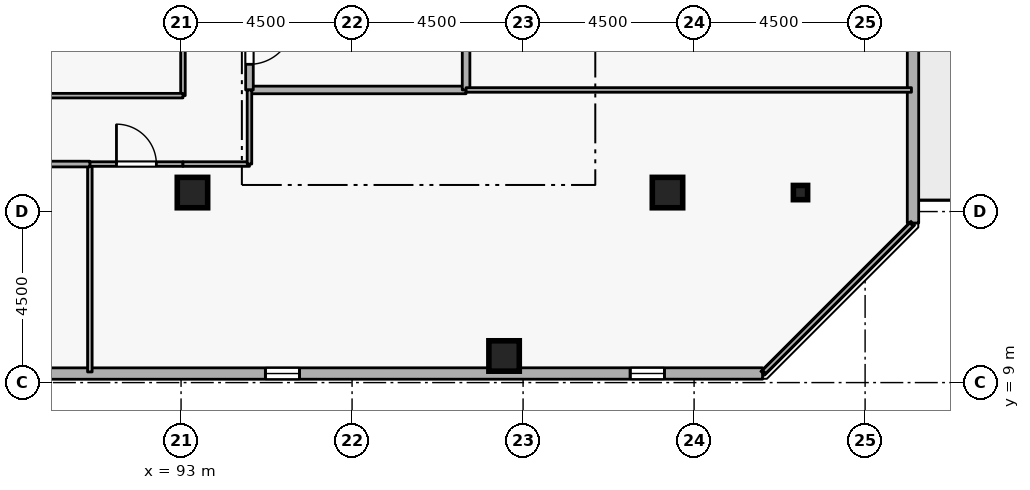
"""IFC4 building model, lengths in metres.
Left out: names, types, materials, properties, quantities, classifications, styles, units other than length and angle.
Written with IfcOpenShell. Run it as: python <this file> out.ifc"""

import sys

from ifc_helpers import new_model, si_unit, direction, frame, frame_2d, origin, origin_2d, place, context, subcontext, project, spatial, rectangle, i_section, extrude, element, fill, save


model = new_model("IFC4")
c1 = context("Model", 3, precision=1e-05, world=origin(), true_north=direction((0.0, 1.0)))
c2 = subcontext(c1, "Body", "Model", "MODEL_VIEW")
j1 = project(units=[si_unit("LENGTHUNIT", "METRE"), si_unit("PLANEANGLEUNIT", "RADIAN")], contexts=[c1])
p1 = place(None, origin())
s1 = spatial("IfcSite", under=j1, at=p1, CompositionType="ELEMENT")
p2 = place(p1, origin())
s2 = spatial("IfcBuilding", under=s1, at=p2, CompositionType="ELEMENT")
p3 = place(p2, frame((0.0, 0.0, 258.3)))
s3 = spatial("IfcBuildingStorey", under=s2, at=p3, CompositionType="ELEMENT", Elevation=258.3)
for number, where, z_axis, x_axis in (
    (1, (105.8, 14.0, 0.0), (0.0, 0.0, 1.0), (1.0, 0.0, 0.0)),
    (2, (101.5, 9.7, 0.0), (0.0, 0.0, 1.0), (1.0, 0.0, 0.0)),
    (3, (93.3, 14.0, 0.0), (0.0, 0.0, 1.0), (1.0, 0.0, 0.0)),
):
    element("IfcColumn", number, at=place(p3, frame(where, z_axis=z_axis, x_axis=x_axis)), inside=s3, PredefinedType="COLUMN", context=c2, shape_type="SweptSolid", body=[
        extrude(rectangle(XDim=0.8, YDim=0.8, at=origin_2d()), origin(), (0.0, 0.0, 1.0), 3.6),
    ])
p4 = place(p3, frame((109.3, 14.0, 0.0), z_axis=(0.0, 0.0, 1.0), x_axis=(1.0, 0.0, 0.0)))
e4 = element("IfcColumn", 4, at=p4, inside=s3, PredefinedType="COLUMN", context=c2, shape_type="SweptSolid", body=[
    extrude(i_section(OverallWidth=0.375, OverallDepth=0.375, WebThickness=0.017, FlangeThickness=0.027, FilletRadius=0.015, at=origin_2d()), origin(), (0.0, 0.0, 1.0), 3.6),
])
p5 = place(p3, frame((73.319, 9.235, 0.0), z_axis=(0.0, 0.0, 1.0), x_axis=(0.999999991209, 0.000132597301, 0.0)))
e5 = element("IfcWall", 5, at=p5, inside=s3, PredefinedType="STANDARD", context=c2, shape_type="SweptSolid", body=[
    extrude(rectangle(XDim=34.983, YDim=0.3, at=frame_2d((17.492, 0.0))), origin(), (0.0, 0.0, 1.0), 2.7),
])
p6 = place(p5, frame((7.5, 0.0, 0.72)))
e6 = element("IfcOpeningElement", 6, at=p6, cuts=e5, PredefinedType="OPENING", context=c2, shape_type="SweptSolid", body=[
    extrude(rectangle(XDim=0.9, YDim=1.75, at=frame_2d((0.45, 0.875))), frame((0.0, 0.16, 0.0), z_axis=(0.0, -1.0, 0.0), x_axis=(1.0, 0.0, 0.0)), (0.0, 0.0, 1.0), 0.32),
])
p7 = place(p5, frame((21.9, 0.0, 0.72)))
e7 = element("IfcOpeningElement", 7, at=p7, cuts=e5, PredefinedType="OPENING", context=c2, shape_type="SweptSolid", body=[
    extrude(rectangle(XDim=0.9, YDim=1.75, at=frame_2d((0.45, 0.875))), frame((0.0, 0.16, 0.0), z_axis=(0.0, -1.0, 0.0), x_axis=(1.0, 0.0, 0.0)), (0.0, 0.0, 1.0), 0.32),
])
p8 = place(p5, frame((31.5, 0.0, 0.72)))
e8 = element("IfcOpeningElement", 8, at=p8, cuts=e5, PredefinedType="OPENING", context=c2, shape_type="SweptSolid", body=[
    extrude(rectangle(XDim=0.9, YDim=1.75, at=frame_2d((0.45, 0.875))), frame((0.0, 0.16, 0.0), z_axis=(0.0, -1.0, 0.0), x_axis=(1.0, 0.0, 0.0)), (0.0, 0.0, 1.0), 0.32),
])
p9 = place(p3, frame((112.26, 13.198, 0.0), z_axis=(0.0, 0.0, 1.0), x_axis=(0.000132597301, 0.999999991209, 0.0)))
e9 = element("IfcWall", 9, at=p9, inside=s3, PredefinedType="STANDARD", context=c2, shape_type="SweptSolid", body=[
    extrude(rectangle(XDim=34.983, YDim=0.3, at=frame_2d((17.492, 0.0))), origin(), (0.0, 0.0, 1.0), 2.7),
])
p10 = place(p9, frame((21.992, 0.0, 0.0)))
e10 = element("IfcOpeningElement", 10, at=p10, cuts=e9, PredefinedType="OPENING", context=c2, shape_type="SweptSolid", body=[
    extrude(rectangle(XDim=1.0, YDim=2.08, at=frame_2d((0.5, 1.04))), frame((0.0, 0.16, 0.0), z_axis=(0.0, -1.0, 0.0), x_axis=(1.0, 0.0, 0.0)), (0.0, 0.0, 1.0), 0.32),
])
p11 = place(p9, frame((7.5, 0.0, 0.72)))
e11 = element("IfcOpeningElement", 11, at=p11, cuts=e9, PredefinedType="OPENING", context=c2, shape_type="SweptSolid", body=[
    extrude(rectangle(XDim=0.9, YDim=1.75, at=frame_2d((0.45, 0.875))), frame((0.0, 0.16, 0.0), z_axis=(0.0, -1.0, 0.0), x_axis=(1.0, 0.0, 0.0)), (0.0, 0.0, 1.0), 0.32),
])
p12 = place(p9, frame((12.3, 0.0, 0.72)))
e12 = element("IfcOpeningElement", 12, at=p12, cuts=e9, PredefinedType="OPENING", context=c2, shape_type="SweptSolid", body=[
    extrude(rectangle(XDim=0.9, YDim=1.75, at=frame_2d((0.45, 0.875))), frame((0.0, 0.16, 0.0), z_axis=(0.0, -1.0, 0.0), x_axis=(1.0, 0.0, 0.0)), (0.0, 0.0, 1.0), 0.32),
])
p13 = place(p9, frame((17.1, 0.0, 0.72)))
e13 = element("IfcOpeningElement", 13, at=p13, cuts=e9, PredefinedType="OPENING", context=c2, shape_type="SweptSolid", body=[
    extrude(rectangle(XDim=0.9, YDim=1.75, at=frame_2d((0.45, 0.875))), frame((0.0, 0.16, 0.0), z_axis=(0.0, -1.0, 0.0), x_axis=(1.0, 0.0, 0.0)), (0.0, 0.0, 1.0), 0.32),
])
p14 = place(p9, frame((26.7, 0.0, 0.72)))
e14 = element("IfcOpeningElement", 14, at=p14, cuts=e9, PredefinedType="OPENING", context=c2, shape_type="SweptSolid", body=[
    extrude(rectangle(XDim=0.9, YDim=1.75, at=frame_2d((0.45, 0.875))), frame((0.0, 0.16, 0.0), z_axis=(0.0, -1.0, 0.0), x_axis=(1.0, 0.0, 0.0)), (0.0, 0.0, 1.0), 0.32),
])
p15 = place(p9, frame((31.5, 0.0, 0.72)))
e15 = element("IfcOpeningElement", 15, at=p15, cuts=e9, PredefinedType="OPENING", context=c2, shape_type="SweptSolid", body=[
    extrude(rectangle(XDim=0.9, YDim=1.75, at=frame_2d((0.45, 0.875))), frame((0.0, 0.16, 0.0), z_axis=(0.0, -1.0, 0.0), x_axis=(1.0, 0.0, 0.0)), (0.0, 0.0, 1.0), 0.32),
])
p16 = place(p3, frame((94.8, 16.7, 0.0), z_axis=(0.0, 0.0, 1.0), x_axis=(1.0, 0.0, 0.0)))
e16 = element("IfcWall", 16, at=p16, inside=s3, PredefinedType="STANDARD", context=c2, shape_type="SweptSolid", body=[
    extrude(rectangle(XDim=5.7, YDim=0.2, at=frame_2d((2.85, 0.0))), origin(), (0.0, 0.0, 1.0), 3.34),
])
p17 = place(p3, frame((100.5, 16.7, 0.0), z_axis=(0.0, 0.0, 1.0), x_axis=(0.0, 1.0, 0.0)))
e17 = element("IfcWall", 17, at=p17, inside=s3, PredefinedType="STANDARD", context=c2, shape_type="SweptSolid", body=[
    extrude(rectangle(XDim=2.5, YDim=0.2, at=frame_2d((1.25, 0.0))), origin(), (0.0, 0.0, 1.0), 3.34),
])
p18 = place(p3, frame((94.8, 19.2, 0.0), z_axis=(0.0, 0.0, 1.0), x_axis=(0.0, -1.0, 0.0)))
e18 = element("IfcWall", 18, at=p18, inside=s3, PredefinedType="STANDARD", context=c2, shape_type="SweptSolid", body=[
    extrude(rectangle(XDim=2.5, YDim=0.2, at=frame_2d((1.25, 0.0))), origin(), (0.0, 0.0, 1.0), 3.34),
])
p19 = place(p18, frame((0.675, 0.0, 0.0)))
e19 = element("IfcOpeningElement", 19, at=p19, cuts=e18, PredefinedType="OPENING", context=c2, shape_type="SweptSolid", body=[
    extrude(rectangle(XDim=1.15, YDim=2.1, at=frame_2d((0.575, 1.05))), frame((0.0, 0.11, 0.0), z_axis=(0.0, -1.0, 0.0), x_axis=(1.0, 0.0, 0.0)), (0.0, 0.0, 1.0), 0.22),
])
p20 = place(p3, frame((90.6, 9.28, 0.0), z_axis=(0.0, 0.0, 1.0), x_axis=(0.0, 1.0, 0.0)))
e20 = element("IfcWall", 20, at=p20, inside=s3, PredefinedType="PARTITIONING", context=c2, shape_type="SweptSolid", body=[
    extrude(rectangle(XDim=5.47, YDim=0.12, at=frame_2d((2.735, 0.0))), origin(), (0.0, 0.0, 1.0), 3.34),
])
p21 = place(p3, frame((90.6, 14.75, 0.0), z_axis=(0.0, 0.0, 1.0), x_axis=(1.0, 0.0, 0.0)))
e21 = element("IfcWall", 21, at=p21, inside=s3, PredefinedType="PARTITIONING", context=c2, shape_type="SweptSolid", body=[
    extrude(rectangle(XDim=2.45, YDim=0.12, at=frame_2d((1.225, 0.0))), origin(), (0.0, 0.0, 1.0), 3.34),
])
p22 = place(p21, frame((0.7, 0.0, 0.0)))
e22 = element("IfcOpeningElement", 22, at=p22, cuts=e21, PredefinedType="OPENING", context=c2, shape_type="SweptSolid", body=[
    extrude(rectangle(XDim=1.05, YDim=2.1, at=frame_2d((0.525, 1.05))), frame((0.0, 0.07, 0.0), z_axis=(0.0, -1.0, 0.0), x_axis=(1.0, 0.0, 0.0)), (0.0, 0.0, 1.0), 0.14),
])
p23 = place(p3, frame((93.05, 14.75, 0.0), z_axis=(0.0, 0.0, 1.0), x_axis=(1.0, 0.0, 0.0)))
e23 = element("IfcWall", 23, at=p23, inside=s3, PredefinedType="PARTITIONING", context=c2, shape_type="SweptSolid", body=[
    extrude(rectangle(XDim=1.75, YDim=0.12, at=frame_2d((0.875, 0.0))), origin(), (0.0, 0.0, 1.0), 3.34),
])
p24 = place(p3, frame((94.8, 14.75, 0.0), z_axis=(0.0, 0.0, 1.0), x_axis=(0.0, 1.0, 0.0)))
e24 = element("IfcWall", 24, at=p24, inside=s3, PredefinedType="PARTITIONING", context=c2, shape_type="SweptSolid", body=[
    extrude(rectangle(XDim=1.95, YDim=0.12, at=frame_2d((0.975, 0.0))), origin(), (0.0, 0.0, 1.0), 3.34),
])
p25 = place(p3, frame((100.5, 16.7, 0.0), z_axis=(0.0, 0.0, 1.0), x_axis=(1.0, 0.0, 0.0)))
e25 = element("IfcWall", 25, at=p25, inside=s3, PredefinedType="PARTITIONING", context=c2, shape_type="SweptSolid", body=[
    extrude(rectangle(XDim=11.72, YDim=0.12, at=frame_2d((5.86, 0.0))), origin(), (0.0, 0.0, 1.0), 3.34),
])
p26 = place(p3, frame((112.22, 13.16, 0.0), z_axis=(0.0, 0.0, 1.0), x_axis=(-0.707106781187, -0.707106781187, 0.0)))
e26 = element("IfcWall", 26, at=p26, inside=s3, PredefinedType="PARTITIONING", context=c2, shape_type="SweptSolid", body=[
    extrude(rectangle(XDim=5.487, YDim=0.12, at=frame_2d((2.743, 0.0))), origin(), (0.0, 0.0, 1.0), 3.34),
])
p27 = place(p3, frame((86.4, 14.75, 0.0), z_axis=(0.0, 0.0, 1.0), x_axis=(1.0, 0.0, 0.0)))
e27 = element("IfcWall", 27, at=p27, inside=s3, PredefinedType="PARTITIONING", context=c2, shape_type="SweptSolid", body=[
    extrude(rectangle(XDim=4.2, YDim=0.15, at=frame_2d((2.1, 0.0))), origin(), (0.0, 0.0, 1.0), 3.34),
])
p28 = place(p27, frame((1.45, 0.0, 0.0)))
e28 = element("IfcOpeningElement", 28, at=p28, cuts=e27, PredefinedType="OPENING", context=c2, shape_type="SweptSolid", body=[
    extrude(rectangle(XDim=1.3, YDim=2.12, at=frame_2d((0.65, 1.06))), frame((0.0, 0.085, 0.0), z_axis=(0.0, -1.0, 0.0), x_axis=(1.0, 0.0, 0.0)), (0.0, 0.0, 1.0), 0.17),
])
p29 = place(p3, frame((93.05, 22.4, 0.0), z_axis=(0.0, 0.0, 1.0), x_axis=(0.0, -1.0, 0.0)))
e29 = element("IfcWall", 29, at=p29, inside=s3, PredefinedType="PARTITIONING", context=c2, shape_type="SweptSolid", body=[
    extrude(rectangle(XDim=5.85, YDim=0.12, at=frame_2d((2.925, 0.0))), origin(), (0.0, 0.0, 1.0), 3.34),
])
p30 = place(p3, frame((93.05, 16.55, 0.0), z_axis=(0.0, 0.0, 1.0), x_axis=(-1.0, 0.0, 0.0)))
e30 = element("IfcWall", 30, at=p30, inside=s3, PredefinedType="PARTITIONING", context=c2, shape_type="SweptSolid", body=[
    extrude(rectangle(XDim=9.1, YDim=0.12, at=frame_2d((4.55, 0.0))), origin(), (0.0, 0.0, 1.0), 3.34),
])
p31 = place(p30, frame((4.075, 0.0, 0.0)))
e31 = element("IfcOpeningElement", 31, at=p31, cuts=e30, PredefinedType="OPENING", context=c2, shape_type="SweptSolid", body=[
    extrude(rectangle(XDim=0.95, YDim=2.1, at=frame_2d((0.475, 1.05))), frame((0.0, 0.07, 0.0), z_axis=(0.0, -1.0, 0.0), x_axis=(1.0, 0.0, 0.0)), (0.0, 0.0, 1.0), 0.14),
])
p32 = place(p7, origin())
e32 = element("IfcWindow", 32, at=p32, inside=s3, PartitioningType="SINGLE_PANEL", PredefinedType="WINDOW", context=c2, shape_type="SweptSolid", body=[
    extrude(rectangle(XDim=0.9, YDim=1.75, at=frame_2d((0.45, 0.875))), frame((0.0, 0.03, 0.0), z_axis=(0.0, -1.0, 0.0), x_axis=(1.0, 0.0, 0.0)), (0.0, 0.0, 1.0), 0.06),
])
fill(e7, e32)
p33 = place(p8, origin())
e33 = element("IfcWindow", 33, at=p33, inside=s3, PartitioningType="SINGLE_PANEL", PredefinedType="WINDOW", context=c2, shape_type="SweptSolid", body=[
    extrude(rectangle(XDim=0.9, YDim=1.75, at=frame_2d((0.45, 0.875))), frame((0.0, 0.03, 0.0), z_axis=(0.0, -1.0, 0.0), x_axis=(1.0, 0.0, 0.0)), (0.0, 0.0, 1.0), 0.06),
])
fill(e8, e33)
p34 = place(p19, origin())
e34 = element("IfcDoor", 34, at=p34, inside=s3, OperationType="SINGLE_SWING_LEFT", PredefinedType="DOOR", context=c2, shape_type="SweptSolid", body=[
    extrude(rectangle(XDim=1.15, YDim=2.1, at=frame_2d((0.575, 1.05))), frame((0.0, 0.025, 0.0), z_axis=(0.0, -1.0, 0.0), x_axis=(1.0, 0.0, 0.0)), (0.0, 0.0, 1.0), 0.05),
])
fill(e19, e34)
p35 = place(p22, origin())
e35 = element("IfcDoor", 35, at=p35, inside=s3, OperationType="SINGLE_SWING_LEFT", PredefinedType="DOOR", context=c2, shape_type="SweptSolid", body=[
    extrude(rectangle(XDim=1.05, YDim=2.1, at=frame_2d((0.525, 1.05))), frame((0.0, 0.025, 0.0), z_axis=(0.0, -1.0, 0.0), x_axis=(1.0, 0.0, 0.0)), (0.0, 0.0, 1.0), 0.05),
])
fill(e22, e35)
save(model, sys.argv[1])
